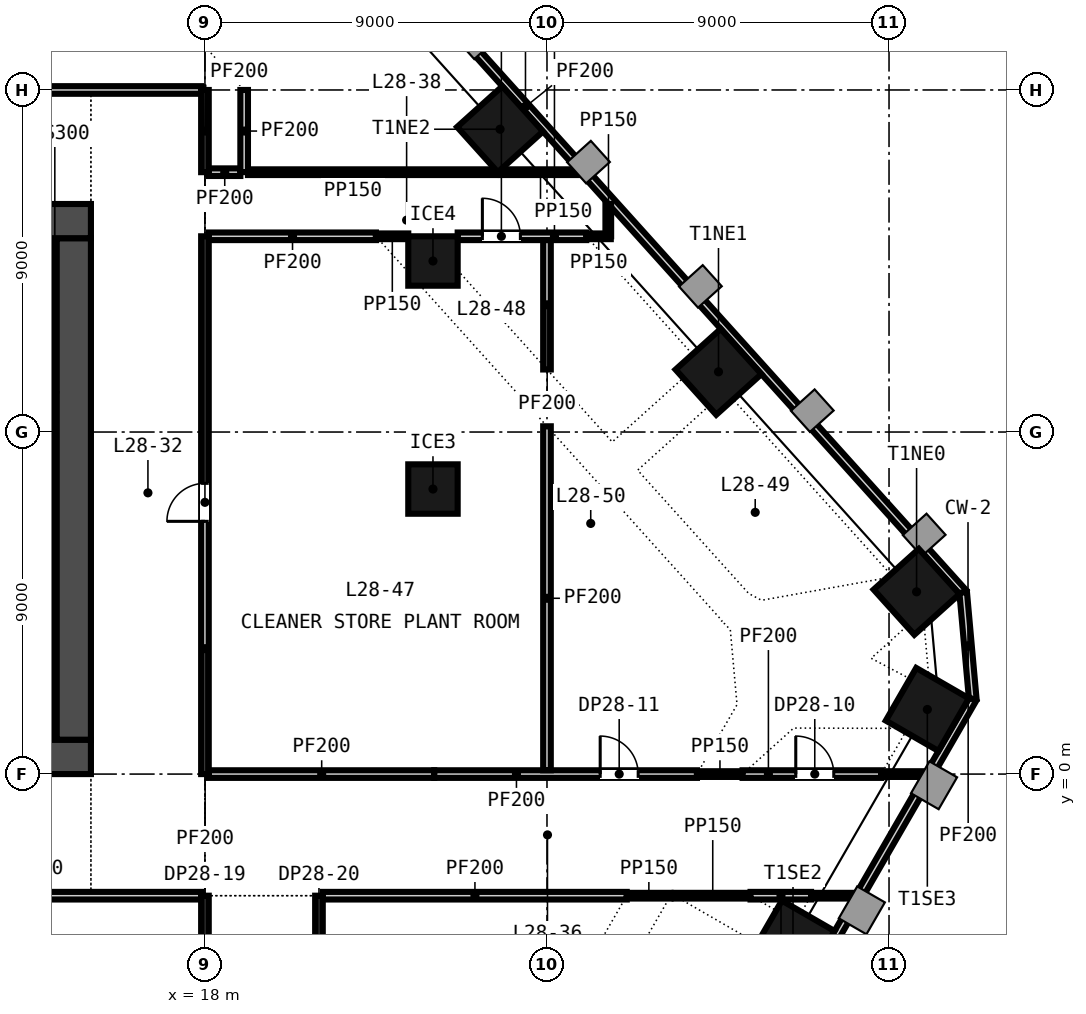
"""IFC4 building model, lengths in metres.
Left out: names, types, materials, properties, quantities, classifications, styles, units other than length and angle.
Written with IfcOpenShell. Run it as: python <this file> out.ifc"""

import sys

from ifc_helpers import new_model, si_unit, direction, frame, frame_2d, origin, origin_2d, place, context, subcontext, project, spatial, rectangle, extrude, element, fill, save


model = new_model("IFC4")
c1 = context("Model", 3, precision=1e-05, world=origin(), true_north=direction((0.0, 1.0)))
c2 = subcontext(c1, "Body", "Model", "MODEL_VIEW")
j1 = project(units=[si_unit("LENGTHUNIT", "METRE"), si_unit("PLANEANGLEUNIT", "RADIAN")], contexts=[c1])
p1 = place(None, origin())
s1 = spatial("IfcSite", under=j1, at=p1, CompositionType="ELEMENT")
p2 = place(p1, origin())
s2 = spatial("IfcBuilding", under=s1, at=p2, CompositionType="ELEMENT")
p3 = place(p2, frame((0.0, 0.0, 117.15)))
s3 = spatial("IfcBuildingStorey", under=s2, at=p3, CompositionType="ELEMENT", Elevation=117.15)
p4 = place(p3, frame((-15.0, 0.45, -0.3), z_axis=(0.0, 0.0, 1.0), x_axis=(1.0, 0.0, 0.0)))
e1 = element("IfcWall", 1, at=p4, inside=s3, PredefinedType="SOLIDWALL", context=c2, shape_type="SweptSolid", body=[
    extrude(rectangle(XDim=30.0, YDim=0.9, at=frame_2d((15.0, 0.0))), origin(), (0.0, 0.0, 1.0), 4.5),
])
p5 = place(p4, frame((5.8, 0.0, 0.3)))
e2 = element("IfcOpeningElement", 2, at=p5, cuts=e1, PredefinedType="OPENING", context=c2, shape_type="SweptSolid", body=[
    extrude(rectangle(XDim=2.4, YDim=2.4, at=frame_2d((1.2, 1.2))), frame((0.0, 0.46, 0.0), z_axis=(0.0, -1.0, 0.0), x_axis=(1.0, 0.0, 0.0)), (0.0, 0.0, 1.0), 0.92),
])
p6 = place(p4, frame((13.8, 0.0, 0.3)))
e3 = element("IfcOpeningElement", 3, at=p6, cuts=e1, PredefinedType="OPENING", context=c2, shape_type="SweptSolid", body=[
    extrude(rectangle(XDim=2.4, YDim=2.4, at=frame_2d((1.2, 1.2))), frame((0.0, 0.46, 0.0), z_axis=(0.0, -1.0, 0.0), x_axis=(1.0, 0.0, 0.0)), (0.0, 0.0, 1.0), 0.92),
])
p7 = place(p4, frame((21.8, 0.0, 0.3)))
e4 = element("IfcOpeningElement", 4, at=p7, cuts=e1, PredefinedType="OPENING", context=c2, shape_type="SweptSolid", body=[
    extrude(rectangle(XDim=2.4, YDim=2.4, at=frame_2d((1.2, 1.2))), frame((0.0, 0.46, 0.0), z_axis=(0.0, -1.0, 0.0), x_axis=(1.0, 0.0, 0.0)), (0.0, 0.0, 1.0), 0.92),
])
p8 = place(p4, frame((1.5, 0.0, 0.3)))
e5 = element("IfcOpeningElement", 5, at=p8, cuts=e1, PredefinedType="OPENING", context=c2, shape_type="SweptSolid", body=[
    extrude(rectangle(XDim=1.2, YDim=2.1, at=frame_2d((0.6, 1.05))), frame((0.0, 0.46, 0.0), z_axis=(0.0, -1.0, 0.0), x_axis=(1.0, 0.0, 0.0)), (0.0, 0.0, 1.0), 0.92),
])
p9 = place(p4, frame((27.3, 0.0, 0.3)))
e6 = element("IfcOpeningElement", 6, at=p9, cuts=e1, PredefinedType="OPENING", context=c2, shape_type="SweptSolid", body=[
    extrude(rectangle(XDim=1.2, YDim=2.1, at=frame_2d((0.6, 1.05))), frame((0.0, 0.46, 0.0), z_axis=(0.0, -1.0, 0.0), x_axis=(1.0, 0.0, 0.0)), (0.0, 0.0, 1.0), 0.92),
])
p10 = place(p3, frame((-15.0, 14.55, -0.3), z_axis=(0.0, 0.0, 1.0), x_axis=(1.0, 0.0, 0.0)))
e7 = element("IfcWall", 7, at=p10, inside=s3, PredefinedType="SOLIDWALL", context=c2, shape_type="SweptSolid", body=[
    extrude(rectangle(XDim=30.0, YDim=0.9, at=frame_2d((15.0, 0.0))), origin(), (0.0, 0.0, 1.0), 4.5),
])
p11 = place(p10, frame((9.25, 0.0, 0.3)))
e8 = element("IfcOpeningElement", 8, at=p11, cuts=e7, PredefinedType="OPENING", context=c2, shape_type="SweptSolid", body=[
    extrude(rectangle(XDim=1.5, YDim=2.1, at=frame_2d((0.75, 1.05))), frame((0.0, 0.46, 0.0), z_axis=(0.0, -1.0, 0.0), x_axis=(1.0, 0.0, 0.0)), (0.0, 0.0, 1.0), 0.92),
])
p12 = place(p10, frame((19.4, 0.0, 0.3)))
e9 = element("IfcOpeningElement", 9, at=p12, cuts=e7, PredefinedType="OPENING", context=c2, shape_type="SweptSolid", body=[
    extrude(rectangle(XDim=1.5, YDim=2.1, at=frame_2d((0.75, 1.05))), frame((0.0, 0.46, 0.0), z_axis=(0.0, -1.0, 0.0), x_axis=(1.0, 0.0, 0.0)), (0.0, 0.0, 1.0), 0.92),
])
p13 = place(p10, frame((1.5, 0.0, 0.3)))
e10 = element("IfcOpeningElement", 10, at=p13, cuts=e7, PredefinedType="OPENING", context=c2, shape_type="SweptSolid", body=[
    extrude(rectangle(XDim=1.2, YDim=2.1, at=frame_2d((0.6, 1.05))), frame((0.0, 0.46, 0.0), z_axis=(0.0, -1.0, 0.0), x_axis=(1.0, 0.0, 0.0)), (0.0, 0.0, 1.0), 0.92),
])
p14 = place(p10, frame((27.3, 0.0, 0.3)))
e11 = element("IfcOpeningElement", 11, at=p14, cuts=e7, PredefinedType="OPENING", context=c2, shape_type="SweptSolid", body=[
    extrude(rectangle(XDim=1.2, YDim=2.1, at=frame_2d((0.6, 1.05))), frame((0.0, 0.46, 0.0), z_axis=(0.0, -1.0, 0.0), x_axis=(1.0, 0.0, 0.0)), (0.0, 0.0, 1.0), 0.92),
])
p15 = place(p3, frame((14.55, 0.9, -0.3), z_axis=(0.0, 0.0, 1.0), x_axis=(0.0, 1.0, 0.0)))
e12 = element("IfcWall", 12, at=p15, inside=s3, PredefinedType="SOLIDWALL", context=c2, shape_type="SweptSolid", body=[
    extrude(rectangle(XDim=13.2, YDim=0.9, at=frame_2d((6.6, 0.0))), origin(), (0.0, 0.0, 1.0), 4.5),
])
for number, where, z_axis, x_axis in (
    (13, (33.473, -4.422, -0.3), (0.0, 0.0, 1.0), (0.5, 0.866, 0.0)),
    (14, (37.008, 1.7, -0.3), (0.0, 0.0, 1.0), (0.5, 0.866, 0.0)),
    (15, (36.725, 4.795, -0.3), (0.0, 0.0, 1.0), (-0.669, 0.743, 0.0)),
    (16, (31.513, 10.584, -0.3), (0.0, 0.0, 1.0), (-0.669, 0.743, 0.0)),
    (17, (25.765, 16.967, -0.3), (0.0, 0.0, 1.0), (-0.669, 0.743, 0.0)),
):
    element("IfcColumn", number, at=place(p3, frame(where, z_axis=z_axis, x_axis=x_axis)), inside=s3, PredefinedType="COLUMN", context=c2, shape_type="SweptSolid", body=[
        extrude(rectangle(XDim=1.6, YDim=1.6, at=origin_2d()), origin(), (0.0, 0.0, 1.0), 4.5),
    ])
for number, where, z_axis, x_axis in (
    (18, (24.0, 7.5, -0.3), (0.0, 0.0, 1.0), (1.0, 0.0, 0.0)),
    (19, (24.0, 13.5, -0.3), (0.0, 0.0, 1.0), (1.0, 0.0, 0.0)),
):
    element("IfcColumn", number, at=place(p3, frame(where, z_axis=z_axis, x_axis=x_axis)), inside=s3, PredefinedType="COLUMN", context=c2, shape_type="SweptSolid", body=[
        extrude(rectangle(XDim=1.3, YDim=1.3, at=origin_2d()), origin(), (0.0, 0.0, 1.0), 4.5),
    ])
p16 = place(p3, frame((11.05, 7.35, 0.0), z_axis=(0.0, 0.0, 1.0), x_axis=(1.0, 0.0, 0.0)))
e20 = element("IfcWall", 20, at=p16, inside=s3, PredefinedType="SOLIDWALL", context=c2, shape_type="SweptSolid", body=[
    extrude(rectangle(XDim=2.95, YDim=0.3, at=frame_2d((1.475, 0.0))), origin(), (0.0, 0.0, 1.0), 4.2),
])
p17 = place(p3, frame((14.05, 0.9, 0.0), z_axis=(0.0, 0.0, 1.0), x_axis=(0.0, 1.0, 0.0)))
e21 = element("IfcWall", 21, at=p17, inside=s3, PredefinedType="SOLIDWALL", context=c2, shape_type="SweptSolid", body=[
    extrude(rectangle(XDim=13.2, YDim=0.1, at=frame_2d((6.6, 0.0))), origin(), (0.0, 0.0, 1.0), 4.2),
])
p18 = place(p3, frame((9.1, -3.2, 0.0), z_axis=(0.0, 0.0, 1.0), x_axis=(1.0, 0.0, 0.0)))
e22 = element("IfcWall", 22, at=p18, inside=s3, PredefinedType="PARTITIONING", context=c2, shape_type="SweptSolid", body=[
    extrude(rectangle(XDim=8.8, YDim=0.2, at=frame_2d((4.4, 0.0))), origin(), (0.0, 0.0, 1.0), 4.2),
])
p19 = place(p3, frame((21.1, -3.2, 0.0), z_axis=(0.0, 0.0, 1.0), x_axis=(1.0, 0.0, 0.0)))
e23 = element("IfcWall", 23, at=p19, inside=s3, PredefinedType="PARTITIONING", context=c2, shape_type="SweptSolid", body=[
    extrude(rectangle(XDim=7.998, YDim=0.2, at=frame_2d((3.999, 0.0))), origin(), (0.0, 0.0, 1.0), 4.2),
])
p20 = place(p3, frame((29.1, -3.2, 0.0), z_axis=(0.0, 0.0, 1.0), x_axis=(1.0, 0.0, 0.0)))
e24 = element("IfcWall", 24, at=p20, inside=s3, PredefinedType="PARTITIONING", context=c2, shape_type="SweptSolid", body=[
    extrude(rectangle(XDim=1.152, YDim=0.15, at=frame_2d((0.576, 0.0))), origin(), (0.0, 0.0, 1.0), 4.2),
])
p21 = place(p3, frame((30.358, -3.2, 0.0), z_axis=(0.0, 0.0, 1.0), x_axis=(1.0, 0.0, 0.0)))
e25 = element("IfcWall", 25, at=p21, inside=s3, PredefinedType="PARTITIONING", context=c2, shape_type="SweptSolid", body=[
    extrude(rectangle(XDim=1.997, YDim=0.15, at=frame_2d((0.999, 0.0))), origin(), (0.0, 0.0, 1.0), 4.2),
])
p22 = place(p3, frame((32.356, -3.2, 0.0), z_axis=(0.0, 0.0, 1.0), x_axis=(1.0, 0.0, 0.0)))
e26 = element("IfcWall", 26, at=p22, inside=s3, PredefinedType="PARTITIONING", context=c2, shape_type="SweptSolid", body=[
    extrude(rectangle(XDim=1.592, YDim=0.2, at=frame_2d((0.796, 0.0))), origin(), (0.0, 0.0, 1.0), 4.2),
])
p23 = place(p3, frame((33.949, -3.2, 0.0), z_axis=(0.0, 0.0, 1.0), x_axis=(1.0, 0.0, 0.0)))
e27 = element("IfcWall", 27, at=p23, inside=s3, PredefinedType="PARTITIONING", context=c2, shape_type="SweptSolid", body=[
    extrude(rectangle(XDim=1.154, YDim=0.15, at=frame_2d((0.577, 0.0))), origin(), (0.0, 0.0, 1.0), 4.2),
])
p24 = place(p3, frame((18.1, 0.0, 0.0), z_axis=(0.0, 0.0, 1.0), x_axis=(1.0, 0.0, 0.0)))
e28 = element("IfcWall", 28, at=p24, inside=s3, PredefinedType="PARTITIONING", context=c2, shape_type="SweptSolid", body=[
    extrude(rectangle(XDim=5.933, YDim=0.2, at=frame_2d((2.967, 0.0))), origin(), (0.0, 0.0, 1.0), 4.2),
])
p25 = place(p3, frame((24.033, 0.0, 0.0), z_axis=(0.0, 0.0, 1.0), x_axis=(1.0, 0.0, 0.0)))
e29 = element("IfcWall", 29, at=p25, inside=s3, PredefinedType="PARTITIONING", context=c2, shape_type="SweptSolid", body=[
    extrude(rectangle(XDim=6.913, YDim=0.2, at=frame_2d((3.457, 0.0))), origin(), (0.0, 0.0, 1.0), 3.6),
])
p26 = place(p25, frame((4.367, 0.0, 0.0)))
e30 = element("IfcOpeningElement", 30, at=p26, cuts=e29, PredefinedType="OPENING", context=c2, shape_type="SweptSolid", body=[
    extrude(rectangle(XDim=1.0, YDim=2.1, at=frame_2d((0.5, 1.05))), frame((0.0, 0.11, 0.0), z_axis=(0.0, -1.0, 0.0), x_axis=(1.0, 0.0, 0.0)), (0.0, 0.0, 1.0), 0.22),
])
p27 = place(p3, frame((30.947, 0.0, 0.0), z_axis=(0.0, 0.0, 1.0), x_axis=(1.0, 0.0, 0.0)))
e31 = element("IfcWall", 31, at=p27, inside=s3, PredefinedType="PARTITIONING", context=c2, shape_type="SweptSolid", body=[
    extrude(rectangle(XDim=1.198, YDim=0.15, at=frame_2d((0.599, 0.0))), origin(), (0.0, 0.0, 1.0), 4.2),
])
p28 = place(p3, frame((32.146, 0.0, 0.0), z_axis=(0.0, 0.0, 1.0), x_axis=(1.0, 0.0, 0.0)))
e32 = element("IfcWall", 32, at=p28, inside=s3, PredefinedType="PARTITIONING", context=c2, shape_type="SweptSolid", body=[
    extrude(rectangle(XDim=3.65, YDim=0.2, at=frame_2d((1.825, 0.0))), origin(), (0.0, 0.0, 1.0), 4.2),
])
p29 = place(p28, frame((1.4, 0.0, 0.0)))
e33 = element("IfcOpeningElement", 33, at=p29, cuts=e32, PredefinedType="OPENING", context=c2, shape_type="SweptSolid", body=[
    extrude(rectangle(XDim=1.0, YDim=2.1, at=frame_2d((0.5, 1.05))), frame((0.0, 0.11, 0.0), z_axis=(0.0, -1.0, 0.0), x_axis=(1.0, 0.0, 0.0)), (0.0, 0.0, 1.0), 0.22),
])
p30 = place(p3, frame((35.797, 0.0, 0.0), z_axis=(0.0, 0.0, 1.0), x_axis=(1.0, 0.0, 0.0)))
e34 = element("IfcWall", 34, at=p30, inside=s3, PredefinedType="PARTITIONING", context=c2, shape_type="SweptSolid", body=[
    extrude(rectangle(XDim=1.154, YDim=0.15, at=frame_2d((0.577, 0.0))), origin(), (0.0, 0.0, 1.0), 4.2),
])
p31 = place(p3, frame((18.1, 14.15, 0.0), z_axis=(0.0, 0.0, 1.0), x_axis=(1.0, 0.0, 0.0)))
e35 = element("IfcWall", 35, at=p31, inside=s3, PredefinedType="PARTITIONING", context=c2, shape_type="SweptSolid", body=[
    extrude(rectangle(XDim=4.399, YDim=0.2, at=frame_2d((2.199, 0.0))), origin(), (0.0, 0.0, 1.0), 4.2),
])
p32 = place(p3, frame((22.5, 14.15, 0.0), z_axis=(0.0, 0.0, 1.0), x_axis=(1.0, 0.0, 0.0)))
e36 = element("IfcWall", 36, at=p32, inside=s3, PredefinedType="PARTITIONING", context=c2, shape_type="SweptSolid", body=[
    extrude(rectangle(XDim=0.85, YDim=0.15, at=frame_2d((0.425, 0.0))), origin(), (0.0, 0.0, 1.0), 4.2),
])
p33 = place(p3, frame((24.65, 14.15, 0.0), z_axis=(0.0, 0.0, 1.0), x_axis=(1.0, 0.0, 0.0)))
e37 = element("IfcWall", 37, at=p33, inside=s3, PredefinedType="PARTITIONING", context=c2, shape_type="SweptSolid", body=[
    extrude(rectangle(XDim=3.383, YDim=0.2, at=frame_2d((1.691, 0.0))), origin(), (0.0, 0.0, 1.0), 4.2),
])
p34 = place(p33, frame((0.65, 0.0, 0.0)))
e38 = element("IfcOpeningElement", 38, at=p34, cuts=e37, PredefinedType="OPENING", context=c2, shape_type="SweptSolid", body=[
    extrude(rectangle(XDim=1.0, YDim=2.1, at=frame_2d((0.5, 1.05))), frame((0.0, 0.11, 0.0), z_axis=(0.0, -1.0, 0.0), x_axis=(1.0, 0.0, 0.0)), (0.0, 0.0, 1.0), 0.22),
])
p35 = place(p3, frame((28.034, 14.15, 0.0), z_axis=(0.0, 0.0, 1.0), x_axis=(1.0, 0.0, 0.0)))
e39 = element("IfcWall", 39, at=p35, inside=s3, PredefinedType="PARTITIONING", context=c2, shape_type="SweptSolid", body=[
    extrude(rectangle(XDim=0.645, YDim=0.15, at=frame_2d((0.322, 0.0))), origin(), (0.0, 0.0, 1.0), 4.2),
])
p36 = place(p3, frame((18.1, 15.837, 0.0), z_axis=(0.0, 0.0, 1.0), x_axis=(1.0, 0.0, 0.0)))
e40 = element("IfcWall", 40, at=p36, inside=s3, PredefinedType="PARTITIONING", context=c2, shape_type="SweptSolid", body=[
    extrude(rectangle(XDim=0.832, YDim=0.2, at=frame_2d((0.416, 0.0))), origin(), (0.0, 0.0, 1.0), 4.2),
])
p37 = place(p3, frame((19.132, 15.837, 0.0), z_axis=(0.0, 0.0, 1.0), x_axis=(1.0, 0.0, 0.0)))
e41 = element("IfcWall", 41, at=p37, inside=s3, PredefinedType="PARTITIONING", context=c2, shape_type="SweptSolid", body=[
    extrude(rectangle(XDim=6.507, YDim=0.15, at=frame_2d((3.253, 0.0))), origin(), (0.0, 0.0, 1.0), 4.2),
])
p38 = place(p3, frame((25.789, 15.837, 0.0), z_axis=(0.0, 0.0, 1.0), x_axis=(1.0, 0.0, 0.0)))
e42 = element("IfcWall", 42, at=p38, inside=s3, PredefinedType="PARTITIONING", context=c2, shape_type="SweptSolid", body=[
    extrude(rectangle(XDim=2.071, YDim=0.15, at=frame_2d((1.035, 0.0))), origin(), (0.0, 0.0, 1.0), 4.2),
])
p39 = place(p3, frame((-21.646, 18.0, 0.0), z_axis=(0.0, 0.0, 1.0), x_axis=(1.0, 0.0, 0.0)))
e43 = element("IfcWall", 43, at=p39, inside=s3, PredefinedType="PARTITIONING", context=c2, shape_type="SweptSolid", body=[
    extrude(rectangle(XDim=39.546, YDim=0.2, at=frame_2d((19.773, 0.0))), origin(), (0.0, 0.0, 1.0), 4.2),
])
p40 = place(p39, frame((8.796, 0.0, 0.0)))
e44 = element("IfcOpeningElement", 44, at=p40, cuts=e43, PredefinedType="OPENING", context=c2, shape_type="SweptSolid", body=[
    extrude(rectangle(XDim=1.0, YDim=2.1, at=frame_2d((0.5, 1.05))), frame((0.0, 0.11, 0.0), z_axis=(0.0, -1.0, 0.0), x_axis=(1.0, 0.0, 0.0)), (0.0, 0.0, 1.0), 0.22),
])
p41 = place(p39, frame((19.9, 0.0, 0.0)))
e45 = element("IfcOpeningElement", 45, at=p41, cuts=e43, PredefinedType="OPENING", context=c2, shape_type="SweptSolid", body=[
    extrude(rectangle(XDim=1.0, YDim=2.1, at=frame_2d((0.5, 1.05))), frame((0.0, 0.11, 0.0), z_axis=(0.0, -1.0, 0.0), x_axis=(1.0, 0.0, 0.0)), (0.0, 0.0, 1.0), 0.22),
])
p42 = place(p39, frame((32.273, 0.0, 0.0)))
e46 = element("IfcOpeningElement", 46, at=p42, cuts=e43, PredefinedType="OPENING", context=c2, shape_type="SweptSolid", body=[
    extrude(rectangle(XDim=1.0, YDim=2.1, at=frame_2d((0.5, 1.05))), frame((0.0, 0.11, 0.0), z_axis=(0.0, -1.0, 0.0), x_axis=(1.0, 0.0, 0.0)), (0.0, 0.0, 1.0), 0.22),
])
p43 = place(p3, frame((18.0, -15.6, 0.0), z_axis=(0.0, 0.0, 1.0), x_axis=(0.0, 1.0, 0.0)))
e47 = element("IfcWall", 47, at=p43, inside=s3, PredefinedType="PARTITIONING", context=c2, shape_type="SweptSolid", body=[
    extrude(rectangle(XDim=12.4, YDim=0.2, at=frame_2d((6.2, 0.0))), origin(), (0.0, 0.0, 1.0), 4.2),
])
p44 = place(p43, frame((5.65, 0.0, 0.0)))
e48 = element("IfcOpeningElement", 48, at=p44, cuts=e47, PredefinedType="OPENING", context=c2, shape_type="SweptSolid", body=[
    extrude(rectangle(XDim=1.0, YDim=2.1, at=frame_2d((0.5, 1.05))), frame((0.0, 0.11, 0.0), z_axis=(0.0, -1.0, 0.0), x_axis=(1.0, 0.0, 0.0)), (0.0, 0.0, 1.0), 0.22),
])
p45 = place(p3, frame((18.0, 0.0, 0.0), z_axis=(0.0, 0.0, 1.0), x_axis=(0.0, 1.0, 0.0)))
e49 = element("IfcWall", 49, at=p45, inside=s3, PredefinedType="PARTITIONING", context=c2, shape_type="SweptSolid", body=[
    extrude(rectangle(XDim=14.15, YDim=0.2, at=frame_2d((7.075, 0.0))), origin(), (0.0, 0.0, 1.0), 4.2),
])
p46 = place(p45, frame((6.65, 0.0, 0.0)))
e50 = element("IfcOpeningElement", 50, at=p46, cuts=e49, PredefinedType="OPENING", context=c2, shape_type="SweptSolid", body=[
    extrude(rectangle(XDim=1.0, YDim=2.1, at=frame_2d((0.5, 1.05))), frame((0.0, 0.11, 0.0), z_axis=(0.0, -1.0, 0.0), x_axis=(1.0, 0.0, 0.0)), (0.0, 0.0, 1.0), 0.22),
])
p47 = place(p3, frame((18.0, 15.837, 0.0), z_axis=(0.0, 0.0, 1.0), x_axis=(0.0, 1.0, 0.0)))
e51 = element("IfcWall", 51, at=p47, inside=s3, PredefinedType="PARTITIONING", context=c2, shape_type="SweptSolid", body=[
    extrude(rectangle(XDim=2.163, YDim=0.2, at=frame_2d((1.081, 0.0))), origin(), (0.0, 0.0, 1.0), 4.2),
])
p48 = place(p3, frame((19.032, 15.838, 0.0), z_axis=(0.0, 0.0, 1.0), x_axis=(0.0, 1.0, 0.0)))
e52 = element("IfcWall", 52, at=p48, inside=s3, PredefinedType="PARTITIONING", context=c2, shape_type="SweptSolid", body=[
    extrude(rectangle(XDim=2.162, YDim=0.2, at=frame_2d((1.081, 0.0))), origin(), (0.0, 0.0, 1.0), 3.797),
])
p49 = place(p3, frame((21.0, -15.6, 0.0), z_axis=(0.0, 0.0, 1.0), x_axis=(0.0, 1.0, 0.0)))
e53 = element("IfcWall", 53, at=p49, inside=s3, PredefinedType="PARTITIONING", context=c2, shape_type="SweptSolid", body=[
    extrude(rectangle(XDim=12.4, YDim=0.2, at=frame_2d((6.2, 0.0))), origin(), (0.0, 0.0, 1.0), 4.2),
])
p50 = place(p49, frame((5.65, 0.0, 0.0)))
e54 = element("IfcOpeningElement", 54, at=p50, cuts=e53, PredefinedType="OPENING", context=c2, shape_type="SweptSolid", body=[
    extrude(rectangle(XDim=1.0, YDim=2.1, at=frame_2d((0.5, 1.05))), frame((0.0, 0.11, 0.0), z_axis=(0.0, -1.0, 0.0), x_axis=(1.0, 0.0, 0.0)), (0.0, 0.0, 1.0), 0.22),
])
p51 = place(p3, frame((27.0, 0.1, 0.0), z_axis=(0.0, 0.0, 1.0), x_axis=(0.0, 1.0, 0.0)))
e55 = element("IfcWall", 55, at=p51, inside=s3, PredefinedType="PARTITIONING", context=c2, shape_type="SweptSolid", body=[
    extrude(rectangle(XDim=9.051, YDim=0.2, at=frame_2d((4.525, 0.0))), origin(), (0.0, 0.0, 1.0), 4.2),
])
p52 = place(p3, frame((27.0, 10.646, 0.0), z_axis=(0.0, 0.0, 1.0), x_axis=(0.0, 1.0, 0.0)))
e56 = element("IfcWall", 56, at=p52, inside=s3, PredefinedType="PARTITIONING", context=c2, shape_type="SweptSolid", body=[
    extrude(rectangle(XDim=3.405, YDim=0.2, at=frame_2d((1.702, 0.0))), origin(), (0.0, 0.0, 1.0), 4.2),
])
p53 = place(p3, frame((28.613, 14.15, 0.0), z_axis=(0.0, 0.0, 1.0), x_axis=(0.0, 1.0, 0.0)))
e57 = element("IfcWall", 57, at=p53, inside=s3, PredefinedType="PARTITIONING", context=c2, shape_type="SweptSolid", body=[
    extrude(rectangle(XDim=0.85, YDim=0.15, at=frame_2d((0.425, 0.0))), origin(), (0.0, 0.0, 1.0), 4.2),
])
p54 = place(p3, frame((14.924, 30.353, 0.0), z_axis=(0.0, 0.0, 1.0), x_axis=(0.669133646521, -0.743142088092, 0.0)))
e58 = element("IfcWall", 58, at=p54, inside=s3, PredefinedType="PARTITIONING", context=c2, shape_type="SweptSolid", body=[
    extrude(rectangle(XDim=34.413, YDim=0.2, at=frame_2d((17.207, 0.0))), origin(), (0.0, 0.0, 1.0), 4.2),
])
p55 = place(p3, frame((37.951, 4.779, 0.0), z_axis=(0.0, 0.0, 1.0), x_axis=(0.089356834429, -0.995999676777, 0.0)))
e59 = element("IfcWall", 59, at=p55, inside=s3, PredefinedType="PARTITIONING", context=c2, shape_type="SweptSolid", body=[
    extrude(rectangle(XDim=2.82, YDim=0.2, at=frame_2d((1.41, 0.0))), origin(), (0.0, 0.0, 1.0), 4.2),
])
p56 = place(p3, frame((38.203, 1.97, 0.0), z_axis=(0.0, 0.0, 1.0), x_axis=(-0.499999050453, -0.866025952005, 0.0)))
e60 = element("IfcWall", 60, at=p56, inside=s3, PredefinedType="PARTITIONING", context=c2, shape_type="SweptSolid", body=[
    extrude(rectangle(XDim=31.53, YDim=0.2, at=frame_2d((15.765, 0.0))), origin(), (0.0, 0.0, 1.0), 4.2),
])
p57 = place(p46, origin())
e61 = element("IfcDoor", 61, at=p57, inside=s3, OperationType="SINGLE_SWING_LEFT", PredefinedType="DOOR", context=c2, shape_type="SweptSolid", body=[
    extrude(rectangle(XDim=1.0, YDim=2.1, at=frame_2d((0.5, 1.05))), frame((0.0, 0.025, 0.0), z_axis=(0.0, -1.0, 0.0), x_axis=(1.0, 0.0, 0.0)), (0.0, 0.0, 1.0), 0.05),
])
fill(e50, e61)
p58 = place(p34, origin())
e62 = element("IfcDoor", 62, at=p58, inside=s3, OperationType="SINGLE_SWING_LEFT", PredefinedType="DOOR", context=c2, shape_type="SweptSolid", body=[
    extrude(rectangle(XDim=1.0, YDim=2.1, at=frame_2d((0.5, 1.05))), frame((0.0, 0.025, 0.0), z_axis=(0.0, -1.0, 0.0), x_axis=(1.0, 0.0, 0.0)), (0.0, 0.0, 1.0), 0.05),
])
fill(e38, e62)
p59 = place(p29, origin())
e63 = element("IfcDoor", 63, at=p59, inside=s3, OperationType="SINGLE_SWING_LEFT", PredefinedType="DOOR", context=c2, shape_type="SweptSolid", body=[
    extrude(rectangle(XDim=1.0, YDim=2.1, at=frame_2d((0.5, 1.05))), frame((0.0, 0.025, 0.0), z_axis=(0.0, -1.0, 0.0), x_axis=(1.0, 0.0, 0.0)), (0.0, 0.0, 1.0), 0.05),
])
fill(e33, e63)
p60 = place(p26, origin())
e64 = element("IfcDoor", 64, at=p60, inside=s3, OperationType="SINGLE_SWING_LEFT", PredefinedType="DOOR", context=c2, shape_type="SweptSolid", body=[
    extrude(rectangle(XDim=1.0, YDim=2.1, at=frame_2d((0.5, 1.05))), frame((0.0, 0.025, 0.0), z_axis=(0.0, -1.0, 0.0), x_axis=(1.0, 0.0, 0.0)), (0.0, 0.0, 1.0), 0.05),
])
fill(e30, e64)
save(model, sys.argv[1])
